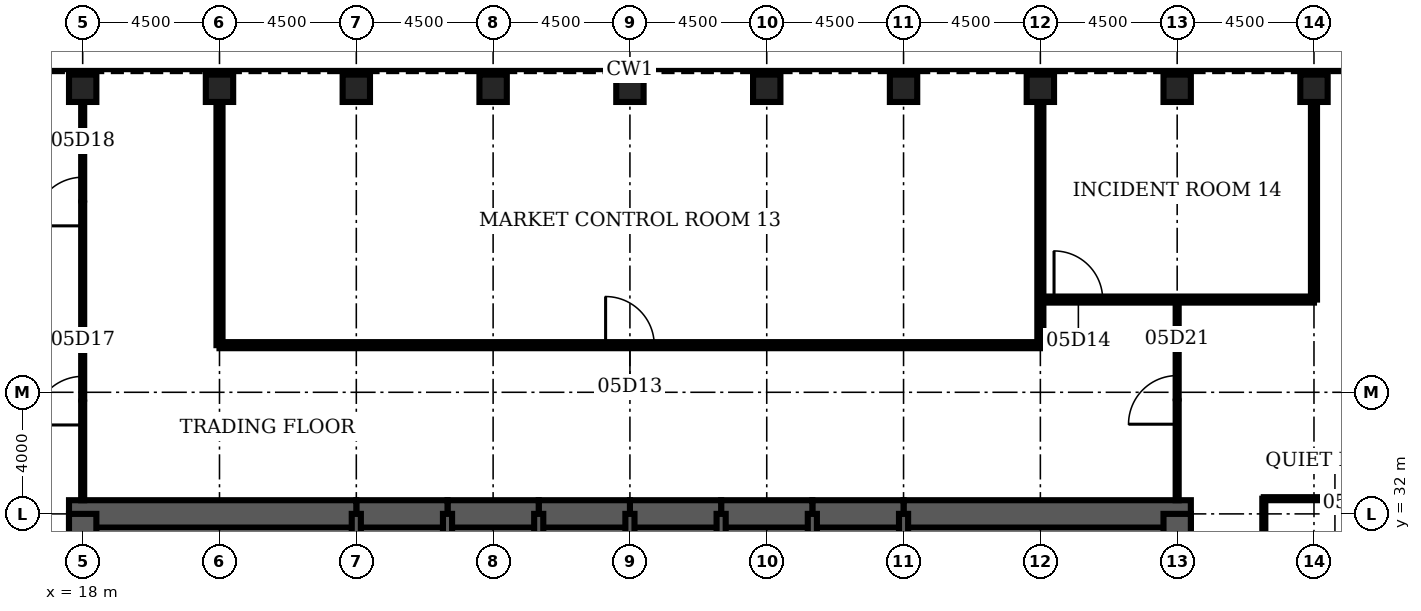
"""IFC4 building model, lengths in metres.
Left out: names, types, materials, properties, quantities, classifications, styles, units other than length and angle.
Written with IfcOpenShell. Run it as: python <this file> out.ifc"""

import sys

from ifc_helpers import new_model, si_unit, direction, frame, frame_2d, origin, origin_2d, place, context, subcontext, project, spatial, rectangle, hollow_rectangle, extrude, element, fill, save


model = new_model("IFC4")
c1 = context("Model", 3, precision=1e-05, world=origin(), true_north=direction((0.0, 1.0)))
c2 = subcontext(c1, "Body", "Model", "MODEL_VIEW")
j1 = project(units=[si_unit("LENGTHUNIT", "METRE"), si_unit("PLANEANGLEUNIT", "RADIAN")], contexts=[c1])
p1 = place(None, origin())
s1 = spatial("IfcSite", under=j1, at=p1, CompositionType="ELEMENT")
p2 = place(p1, origin())
s2 = spatial("IfcBuilding", under=s1, at=p2, CompositionType="ELEMENT")
p3 = place(p2, frame((0.0, 0.0, 27.5)))
s3 = spatial("IfcBuildingStorey", under=s2, at=p3, CompositionType="ELEMENT", Elevation=27.5)
for number, where, z_axis, x_axis in (
    (1, (58.5, 46.0, 0.0), (0.0, 0.0, 1.0), (0.0, 1.0, 0.0)),
    (2, (54.0, 46.0, 0.0), (0.0, 0.0, 1.0), (0.0, 1.0, 0.0)),
    (3, (49.5, 46.0, 0.0), (0.0, 0.0, 1.0), (0.0, 1.0, 0.0)),
    (4, (45.0, 46.0, 0.0), (0.0, 0.0, 1.0), (0.0, 1.0, 0.0)),
    (5, (40.5, 46.0, 0.0), (0.0, 0.0, 1.0), (0.0, 1.0, 0.0)),
    (6, (36.0, 46.0, 0.0), (0.0, 0.0, 1.0), (0.0, 1.0, 0.0)),
    (7, (31.5, 46.0, 0.0), (0.0, 0.0, 1.0), (0.0, 1.0, 0.0)),
    (8, (27.0, 46.0, 0.0), (0.0, 0.0, 1.0), (0.0, 1.0, 0.0)),
    (9, (22.5, 46.0, 0.0), (0.0, 0.0, 1.0), (0.0, 1.0, 0.0)),
    (10, (18.0, 46.0, 0.0), (0.0, 0.0, 1.0), (0.0, 1.0, 0.0)),
):
    element("IfcColumn", number, at=place(p3, frame(where, z_axis=z_axis, x_axis=x_axis)), inside=s3, PredefinedType="COLUMN", context=c2, shape_type="SweptSolid", body=[
        extrude(hollow_rectangle(XDim=0.9, YDim=0.9, WallThickness=0.12, at=origin_2d()), origin(), (0.0, 0.0, 1.0), 4.5),
    ])
p4 = place(p3, frame((54.45, 32.0, 0.0), z_axis=(0.0, 0.0, 1.0), x_axis=(-1.0, 0.0, 0.0)))
e11 = element("IfcWall", 11, at=p4, inside=s3, PredefinedType="SHEAR", context=c2, shape_type="SweptSolid", body=[
    extrude(rectangle(XDim=9.45, YDim=0.9, at=frame_2d((4.725, 0.0))), origin(), (0.0, 0.0, 1.0), 4.5),
])
for number, where, z_axis, x_axis in (
    (12, (45.0, 32.0, 0.0), (0.0, 0.0, 1.0), (-1.0, 0.0, 0.0)),
    (13, (42.0, 32.0, 0.0), (0.0, 0.0, 1.0), (-1.0, 0.0, 0.0)),
    (14, (39.0, 32.0, 0.0), (0.0, 0.0, 1.0), (-1.0, 0.0, 0.0)),
    (15, (36.0, 32.0, 0.0), (0.0, 0.0, 1.0), (-1.0, 0.0, 0.0)),
    (16, (33.0, 32.0, 0.0), (0.0, 0.0, 1.0), (-1.0, 0.0, 0.0)),
    (17, (30.0, 32.0, 0.0), (0.0, 0.0, 1.0), (-1.0, 0.0, 0.0)),
):
    element("IfcWall", number, at=place(p3, frame(where, z_axis=z_axis, x_axis=x_axis)), inside=s3, PredefinedType="SHEAR", context=c2, shape_type="SweptSolid", body=[
        extrude(rectangle(XDim=3.0, YDim=0.9, at=frame_2d((1.5, 0.0))), origin(), (0.0, 0.0, 1.0), 4.5),
    ])
p5 = place(p3, frame((27.0, 32.0, 0.0), z_axis=(0.0, 0.0, 1.0), x_axis=(-1.0, 0.0, 0.0)))
e18 = element("IfcWall", 18, at=p5, inside=s3, PredefinedType="SHEAR", context=c2, shape_type="SweptSolid", body=[
    extrude(rectangle(XDim=9.45, YDim=0.9, at=frame_2d((4.725, 0.0))), origin(), (0.0, 0.0, 1.0), 4.5),
])
for number, where, z_axis, x_axis in (
    (19, (18.0, 32.0, 0.0), (0.0, 0.0, 1.0), (0.0, -1.0, 0.0)),
    (20, (54.0, 28.8, 0.0), (0.0, 0.0, 1.0), (0.0, 1.0, 0.0)),
):
    element("IfcWall", number, at=place(p3, frame(where, z_axis=z_axis, x_axis=x_axis)), inside=s3, PredefinedType="SHEAR", context=c2, shape_type="SweptSolid", body=[
        extrude(rectangle(XDim=3.2, YDim=0.9, at=frame_2d((1.6, 0.0))), origin(), (0.0, 0.0, 1.0), 4.5),
    ])
for number, where, z_axis, x_axis in (
    (21, (27.0, 28.8, 0.0), (0.0, 0.0, 1.0), (0.0, 1.0, 0.0)),
    (22, (30.0, 28.8, 0.0), (0.0, 0.0, 1.0), (0.0, 1.0, 0.0)),
    (23, (33.0, 28.8, 0.0), (0.0, 0.0, 1.0), (0.0, 1.0, 0.0)),
    (24, (36.0, 28.8, 0.0), (0.0, 0.0, 1.0), (0.0, 1.0, 0.0)),
    (25, (39.0, 28.8, 0.0), (0.0, 0.0, 1.0), (0.0, 1.0, 0.0)),
    (26, (42.0, 28.8, 0.0), (0.0, 0.0, 1.0), (0.0, 1.0, 0.0)),
    (27, (45.0, 28.8, 0.0), (0.0, 0.0, 1.0), (0.0, 1.0, 0.0)),
):
    element("IfcWall", number, at=place(p3, frame(where, z_axis=z_axis, x_axis=x_axis)), inside=s3, PredefinedType="SOLIDWALL", context=c2, shape_type="SweptSolid", body=[
        extrude(rectangle(XDim=3.2, YDim=0.3, at=frame_2d((1.6, 0.0))), origin(), (0.0, 0.0, 1.0), 4.5),
    ])
p6 = place(p3, frame((56.85, 32.5, 0.0), z_axis=(0.0, 0.0, 1.0), x_axis=(1.0, 0.0, 0.0)))
e28 = element("IfcWall", 28, at=p6, inside=s3, PredefinedType="PARTITIONING", context=c2, shape_type="SweptSolid", body=[
    extrude(rectangle(XDim=3.0, YDim=0.1, at=frame_2d((1.5, 0.0))), origin(), (0.0, 0.0, 1.0), 3.0),
])
p7 = place(p3, frame((22.5, 37.55, 0.0), z_axis=(0.0, 0.0, 1.0), x_axis=(1.0, 0.0, 0.0)))
e29 = element("IfcWall", 29, at=p7, inside=s3, PredefinedType="PARTITIONING", context=c2, shape_type="SweptSolid", body=[
    extrude(rectangle(XDim=27.0, YDim=0.2, at=frame_2d((13.5, 0.0))), origin(), (0.0, 0.0, 1.0), 3.0),
])
p8 = place(p7, frame((12.7, 0.0, 0.0)))
e30 = element("IfcOpeningElement", 30, at=p8, cuts=e29, PredefinedType="OPENING", context=c2, shape_type="SweptSolid", body=[
    extrude(rectangle(XDim=1.6, YDim=2.1, at=frame_2d((0.8, 1.05))), frame((0.0, 0.11, 0.0), z_axis=(0.0, -1.0, 0.0), x_axis=(1.0, 0.0, 0.0)), (0.0, 0.0, 1.0), 0.22),
])
p9 = place(p3, frame((49.5, 39.05, 0.0), z_axis=(0.0, 0.0, 1.0), x_axis=(1.0, 0.0, 0.0)))
e31 = element("IfcWall", 31, at=p9, inside=s3, PredefinedType="PARTITIONING", context=c2, shape_type="SweptSolid", body=[
    extrude(rectangle(XDim=9.0, YDim=0.2, at=frame_2d((4.5, 0.0))), origin(), (0.0, 0.0, 1.0), 3.0),
])
p10 = place(p9, frame((0.45, 0.0, 0.0)))
e32 = element("IfcOpeningElement", 32, at=p10, cuts=e31, PredefinedType="OPENING", context=c2, shape_type="SweptSolid", body=[
    extrude(rectangle(XDim=1.6, YDim=2.1, at=frame_2d((0.8, 1.05))), frame((0.0, 0.11, 0.0), z_axis=(0.0, -1.0, 0.0), x_axis=(1.0, 0.0, 0.0)), (0.0, 0.0, 1.0), 0.22),
])
p11 = place(p3, frame((18.0, 32.45, 0.0), z_axis=(0.0, 0.0, 1.0), x_axis=(0.0, 1.0, 0.0)))
e33 = element("IfcWall", 33, at=p11, inside=s3, PredefinedType="PARTITIONING", context=c2, shape_type="SweptSolid", body=[
    extrude(rectangle(XDim=13.1, YDim=0.1, at=frame_2d((6.55, 0.0))), origin(), (0.0, 0.0, 1.0), 3.0),
])
p12 = place(p11, frame((2.475, 0.0, 0.0)))
e34 = element("IfcOpeningElement", 34, at=p12, cuts=e33, PredefinedType="OPENING", context=c2, shape_type="SweptSolid", body=[
    extrude(rectangle(XDim=1.6, YDim=2.1, at=frame_2d((0.8, 1.05))), frame((0.0, 0.06, 0.0), z_axis=(0.0, -1.0, 0.0), x_axis=(1.0, 0.0, 0.0)), (0.0, 0.0, 1.0), 0.12),
])
p13 = place(p11, frame((9.025, 0.0, 0.0)))
e35 = element("IfcOpeningElement", 35, at=p13, cuts=e33, PredefinedType="OPENING", context=c2, shape_type="SweptSolid", body=[
    extrude(rectangle(XDim=1.6, YDim=2.1, at=frame_2d((0.8, 1.05))), frame((0.0, 0.06, 0.0), z_axis=(0.0, -1.0, 0.0), x_axis=(1.0, 0.0, 0.0)), (0.0, 0.0, 1.0), 0.12),
])
for number, where, z_axis, x_axis in (
    (36, (22.5, 37.55, 0.0), (0.0, 0.0, 1.0), (0.0, 1.0, 0.0)),
    (37, (49.5, 37.55, 0.0), (0.0, 0.0, 1.0), (0.0, 1.0, 0.0)),
):
    element("IfcWall", number, at=place(p3, frame(where, z_axis=z_axis, x_axis=x_axis)), inside=s3, PredefinedType="PARTITIONING", context=c2, shape_type="SweptSolid", body=[
        extrude(rectangle(XDim=8.0, YDim=0.2, at=frame_2d((4.0, 0.0))), origin(), (0.0, 0.0, 1.0), 3.0),
    ])
p14 = place(p3, frame((54.0, 32.45, 0.0), z_axis=(0.0, 0.0, 1.0), x_axis=(0.0, 1.0, 0.0)))
e38 = element("IfcWall", 38, at=p14, inside=s3, PredefinedType="PARTITIONING", context=c2, shape_type="SweptSolid", body=[
    extrude(rectangle(XDim=6.6, YDim=0.1, at=frame_2d((3.3, 0.0))), origin(), (0.0, 0.0, 1.0), 3.0),
])
p15 = place(p14, frame((2.5, 0.0, 0.0)))
e39 = element("IfcOpeningElement", 39, at=p15, cuts=e38, PredefinedType="OPENING", context=c2, shape_type="SweptSolid", body=[
    extrude(rectangle(XDim=1.6, YDim=2.1, at=frame_2d((0.8, 1.05))), frame((0.0, 0.06, 0.0), z_axis=(0.0, -1.0, 0.0), x_axis=(1.0, 0.0, 0.0)), (0.0, 0.0, 1.0), 0.12),
])
p16 = place(p3, frame((56.85, 29.5, 0.0), z_axis=(0.0, 0.0, 1.0), x_axis=(0.0, 1.0, 0.0)))
e40 = element("IfcWall", 40, at=p16, inside=s3, PredefinedType="PARTITIONING", context=c2, shape_type="SweptSolid", body=[
    extrude(rectangle(XDim=3.0, YDim=0.1, at=frame_2d((1.5, 0.0))), origin(), (0.0, 0.0, 1.0), 3.0),
])
p17 = place(p3, frame((58.5, 39.05, 0.0), z_axis=(0.0, 0.0, 1.0), x_axis=(0.0, 1.0, 0.0)))
e41 = element("IfcWall", 41, at=p17, inside=s3, PredefinedType="PARTITIONING", context=c2, shape_type="SweptSolid", body=[
    extrude(rectangle(XDim=6.5, YDim=0.2, at=frame_2d((3.25, 0.0))), origin(), (0.0, 0.0, 1.0), 3.0),
])
p18 = place(p8, origin())
e42 = element("IfcDoor", 42, at=p18, inside=s3, OperationType="SINGLE_SWING_LEFT", PredefinedType="DOOR", context=c2, shape_type="SweptSolid", body=[
    extrude(rectangle(XDim=1.6, YDim=2.1, at=frame_2d((0.8, 1.05))), frame((0.0, 0.025, 0.0), z_axis=(0.0, -1.0, 0.0), x_axis=(1.0, 0.0, 0.0)), (0.0, 0.0, 1.0), 0.05),
])
fill(e30, e42)
p19 = place(p10, origin())
e43 = element("IfcDoor", 43, at=p19, inside=s3, OperationType="SINGLE_SWING_LEFT", PredefinedType="DOOR", context=c2, shape_type="SweptSolid", body=[
    extrude(rectangle(XDim=1.6, YDim=2.1, at=frame_2d((0.8, 1.05))), frame((0.0, 0.025, 0.0), z_axis=(0.0, -1.0, 0.0), x_axis=(1.0, 0.0, 0.0)), (0.0, 0.0, 1.0), 0.05),
])
fill(e32, e43)
p20 = place(p12, origin())
e44 = element("IfcDoor", 44, at=p20, inside=s3, OperationType="SINGLE_SWING_LEFT", PredefinedType="DOOR", context=c2, shape_type="SweptSolid", body=[
    extrude(rectangle(XDim=1.6, YDim=2.1, at=frame_2d((0.8, 1.05))), frame((0.0, 0.025, 0.0), z_axis=(0.0, -1.0, 0.0), x_axis=(1.0, 0.0, 0.0)), (0.0, 0.0, 1.0), 0.05),
])
fill(e34, e44)
p21 = place(p13, origin())
e45 = element("IfcDoor", 45, at=p21, inside=s3, OperationType="SINGLE_SWING_LEFT", PredefinedType="DOOR", context=c2, shape_type="SweptSolid", body=[
    extrude(rectangle(XDim=1.6, YDim=2.1, at=frame_2d((0.8, 1.05))), frame((0.0, 0.025, 0.0), z_axis=(0.0, -1.0, 0.0), x_axis=(1.0, 0.0, 0.0)), (0.0, 0.0, 1.0), 0.05),
])
fill(e35, e45)
p22 = place(p15, origin())
e46 = element("IfcDoor", 46, at=p22, inside=s3, OperationType="SINGLE_SWING_LEFT", PredefinedType="DOOR", context=c2, shape_type="SweptSolid", body=[
    extrude(rectangle(XDim=1.6, YDim=2.1, at=frame_2d((0.8, 1.05))), frame((0.0, 0.025, 0.0), z_axis=(0.0, -1.0, 0.0), x_axis=(1.0, 0.0, 0.0)), (0.0, 0.0, 1.0), 0.05),
])
fill(e39, e46)
save(model, sys.argv[1])
